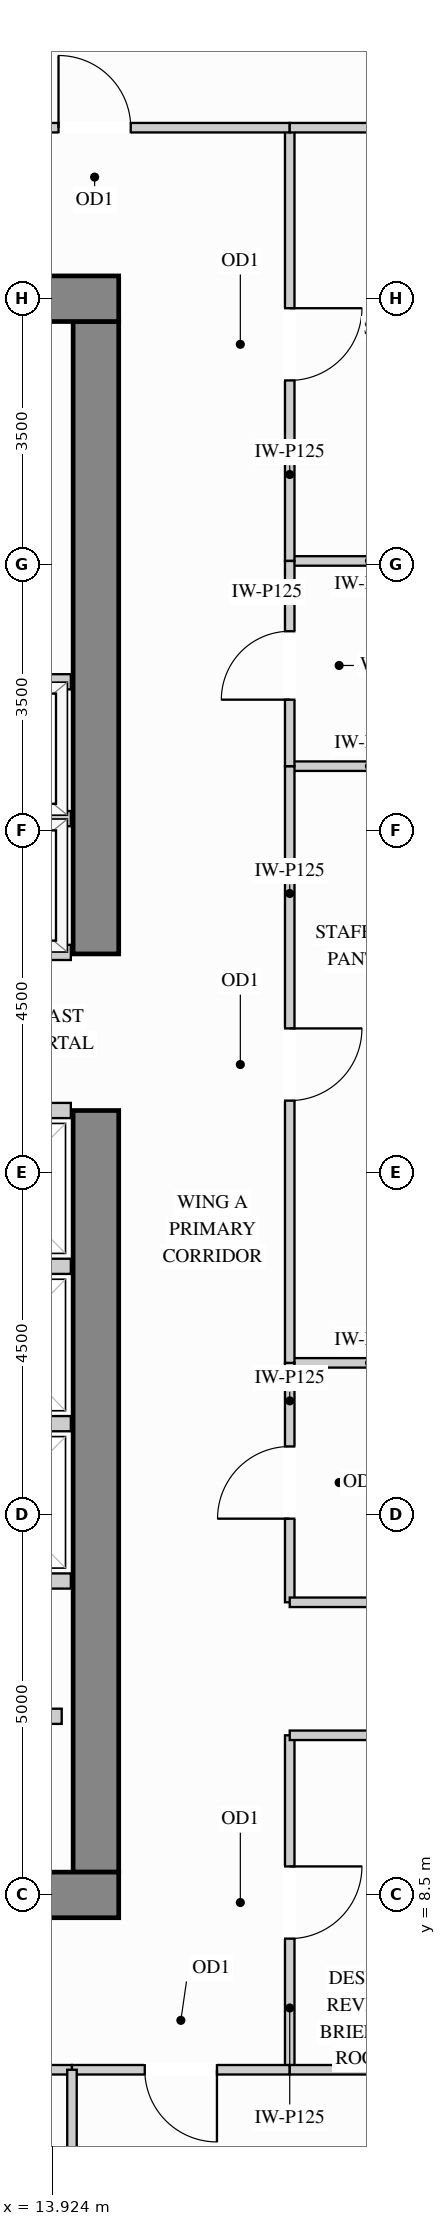
"""IFC4 building model, lengths in metres.
Left out: names, types, materials, properties, quantities, classifications, styles, units other than length and angle.
Written with IfcOpenShell. Run it as: python <this file> out.ifc"""

import sys

from ifc_helpers import new_model, si_unit, direction, frame, frame_2d, origin, place, context, subcontext, project, spatial, rectangle, extrude, source, transform, mapped, element, fill, save


model = new_model("IFC4")
c1 = context("Model", 3, precision=1e-05, world=origin(), true_north=direction((0.0, 1.0)))
c2 = subcontext(c1, "Body", "Model", "MODEL_VIEW")
j1 = project(units=[si_unit("LENGTHUNIT", "METRE"), si_unit("PLANEANGLEUNIT", "RADIAN")], contexts=[c1])
p1 = place(None, origin())
s1 = spatial("IfcSite", under=j1, at=p1, CompositionType="ELEMENT")
p2 = place(p1, origin())
s2 = spatial("IfcBuilding", under=s1, at=p2, CompositionType="ELEMENT")
p3 = place(p2, frame((0.0, 0.0, 200.7)))
s3 = spatial("IfcBuildingStorey", under=s2, at=p3, CompositionType="ELEMENT", Elevation=200.7)
m1 = source(origin(), c2, "Body", "SweptSolid", [
    extrude(rectangle(XDim=10.02, YDim=0.6, at=frame_2d((5.01, 0.0))), origin(), (0.0, 0.0, 1.0), 3.4),
])
p4 = place(p3, frame((14.5, 8.8, 0.0), z_axis=(0.0, 0.0, 1.0), x_axis=(0.0, 1.0, 0.0)))
e1 = element("IfcWall", 1, at=p4, inside=s3, PredefinedType="SHEAR", context=c2, shape_type="MappedRepresentation", body=[
    mapped(m1, transform((0.0, 0.0, 0.0), x_axis=(1.0, 0.0, 0.0), y_axis=(0.0, 1.0, 0.0), z_axis=(0.0, 0.0, 1.0))),
])
m2 = source(origin(), c2, "Body", "SweptSolid", [
    extrude(rectangle(XDim=8.32, YDim=0.6, at=frame_2d((4.16, 0.0))), origin(), (0.0, 0.0, 1.0), 3.4),
])
p5 = place(p3, frame((14.5, 20.88, 0.0), z_axis=(0.0, 0.0, 1.0), x_axis=(0.0, 1.0, 0.0)))
e2 = element("IfcWall", 2, at=p5, inside=s3, PredefinedType="SHEAR", context=c2, shape_type="MappedRepresentation", body=[
    mapped(m2, transform((0.0, 0.0, 0.0), x_axis=(1.0, 0.0, 0.0), y_axis=(0.0, 1.0, 0.0), z_axis=(0.0, 0.0, 1.0))),
])
m3 = source(origin(), c2, "Body", "SweptSolid", [
    extrude(rectangle(XDim=10.6, YDim=0.6, at=frame_2d((5.3, 0.0))), origin(), (0.0, 0.0, 1.0), 3.4),
])
for number, where, z_axis, x_axis in (
    (3, (4.2, 29.5, 0.0), (0.0, 0.0, 1.0), (1.0, 0.0, 0.0)),
    (4, (4.2, 8.5, 0.0), (0.0, 0.0, 1.0), (1.0, 0.0, 0.0)),
):
    element("IfcWall", number, at=place(p3, frame(where, z_axis=z_axis, x_axis=x_axis)), inside=s3, PredefinedType="SHEAR", context=c2, shape_type="MappedRepresentation", body=[
        mapped(m3, transform((0.0, 0.0, 0.0), x_axis=(1.0, 0.0, 0.0), y_axis=(0.0, 1.0, 0.0), z_axis=(0.0, 0.0, 1.0))),
    ])
m4 = source(origin(), c2, "Body", "SweptSolid", [
    extrude(rectangle(XDim=2.1, YDim=0.125, at=frame_2d((1.05, 0.0))), origin(), (0.0, 0.0, 1.0), 3.385),
])
p6 = place(p3, frame((17.05, 15.5, 0.0), z_axis=(0.0, 0.0, 1.0), x_axis=(1.0, 0.0, 0.0)))
e5 = element("IfcWall", 5, at=p6, inside=s3, PredefinedType="PARTITIONING", context=c2, shape_type="MappedRepresentation", body=[
    mapped(m4, transform((0.0, 0.0, 0.0), x_axis=(1.0, 0.0, 0.0), y_axis=(0.0, 1.0, 0.0), z_axis=(0.0, 0.0, 1.0))),
])
m5 = source(origin(), c2, "Body", "SweptSolid", [
    extrude(rectangle(XDim=2.098, YDim=0.125, at=frame_2d((1.049, 0.0))), origin(), (0.0, 0.0, 1.0), 3.385),
])
for number, where, z_axis, x_axis in (
    (6, (17.05, 23.35, 0.0), (0.0, 0.0, 1.0), (1.0, 0.0, 0.0)),
    (7, (17.05, 26.05, 0.0), (0.0, 0.0, 1.0), (1.0, 0.0, 0.0)),
):
    element("IfcWall", number, at=place(p3, frame(where, z_axis=z_axis, x_axis=x_axis)), inside=s3, PredefinedType="PARTITIONING", context=c2, shape_type="MappedRepresentation", body=[
        mapped(m5, transform((0.0, 0.0, 0.0), x_axis=(1.0, 0.0, 0.0), y_axis=(0.0, 1.0, 0.0), z_axis=(0.0, 0.0, 1.0))),
    ])
p7 = place(p3, frame((17.05, 12.35, 0.0), z_axis=(0.0, 0.0, 1.0), x_axis=(0.0, 1.0, 0.0)))
e8 = element("IfcWall", 8, at=p7, inside=s3, PredefinedType="PARTITIONING", context=c2, shape_type="SweptSolid", body=[
    extrude(rectangle(XDim=3.15, YDim=0.125, at=frame_2d((1.575, 0.0))), origin(), (0.0, 0.0, 1.0), 3.385),
])
p8 = place(p7, frame((1.1, 0.0, 0.0)))
e9 = element("IfcOpeningElement", 9, at=p8, cuts=e8, PredefinedType="OPENING", context=c2, shape_type="SweptSolid", body=[
    extrude(rectangle(XDim=0.95, YDim=2.15, at=frame_2d((0.475, 1.075))), frame((0.0, 0.073, 0.0), z_axis=(0.0, -1.0, 0.0), x_axis=(1.0, 0.0, 0.0)), (0.0, 0.0, 1.0), 0.145),
])
p9 = place(p3, frame((17.05, 15.5, 0.0), z_axis=(0.0, 0.0, 1.0), x_axis=(0.0, 1.0, 0.0)))
e10 = element("IfcWall", 10, at=p9, inside=s3, PredefinedType="PARTITIONING", context=c2, shape_type="SweptSolid", body=[
    extrude(rectangle(XDim=7.85, YDim=0.125, at=frame_2d((3.925, 0.0))), origin(), (0.0, 0.0, 1.0), 3.385),
])
p10 = place(p9, frame((3.45, 0.0, 0.0)))
e11 = element("IfcOpeningElement", 11, at=p10, cuts=e10, PredefinedType="OPENING", context=c2, shape_type="SweptSolid", body=[
    extrude(rectangle(XDim=0.95, YDim=2.15, at=frame_2d((0.475, 1.075))), frame((0.0, 0.073, 0.0), z_axis=(0.0, -1.0, 0.0), x_axis=(1.0, 0.0, 0.0)), (0.0, 0.0, 1.0), 0.145),
])
p11 = place(p3, frame((17.05, 26.05, 0.0), z_axis=(0.0, 0.0, 1.0), x_axis=(0.0, 1.0, 0.0)))
e12 = element("IfcWall", 12, at=p11, inside=s3, PredefinedType="PARTITIONING", context=c2, shape_type="SweptSolid", body=[
    extrude(rectangle(XDim=5.7, YDim=0.125, at=frame_2d((2.85, 0.0))), origin(), (0.0, 0.0, 1.0), 3.385),
])
p12 = place(p11, frame((2.375, 0.0, 0.0)))
e13 = element("IfcOpeningElement", 13, at=p12, cuts=e12, PredefinedType="OPENING", context=c2, shape_type="SweptSolid", body=[
    extrude(rectangle(XDim=0.95, YDim=2.15, at=frame_2d((0.475, 1.075))), frame((0.0, 0.073, 0.0), z_axis=(0.0, -1.0, 0.0), x_axis=(1.0, 0.0, 0.0)), (0.0, 0.0, 1.0), 0.145),
])
p13 = place(p3, frame((17.05, 6.2, 0.0), z_axis=(0.0, 0.0, 1.0), x_axis=(0.0, 1.0, 0.0)))
e14 = element("IfcWall", 14, at=p13, inside=s3, PredefinedType="PARTITIONING", context=c2, shape_type="SweptSolid", body=[
    extrude(rectangle(XDim=4.4, YDim=0.125, at=frame_2d((2.2, 0.0))), origin(), (0.0, 0.0, 1.0), 3.385),
])
p14 = place(p13, frame((1.725, 0.0, 0.0)))
e15 = element("IfcOpeningElement", 15, at=p14, cuts=e14, PredefinedType="OPENING", context=c2, shape_type="SweptSolid", body=[
    extrude(rectangle(XDim=0.95, YDim=2.15, at=frame_2d((0.475, 1.075))), frame((0.0, 0.073, 0.0), z_axis=(0.0, -1.0, 0.0), x_axis=(1.0, 0.0, 0.0)), (0.0, 0.0, 1.0), 0.145),
])
p15 = place(p3, frame((17.05, 23.35, 0.0), z_axis=(0.0, 0.0, 1.0), x_axis=(0.0, 1.0, 0.0)))
e16 = element("IfcWall", 16, at=p15, inside=s3, PredefinedType="PARTITIONING", context=c2, shape_type="SweptSolid", body=[
    extrude(rectangle(XDim=2.7, YDim=0.125, at=frame_2d((1.35, 0.0))), origin(), (0.0, 0.0, 1.0), 3.385),
])
p16 = place(p15, frame((0.875, 0.0, 0.0)))
e17 = element("IfcOpeningElement", 17, at=p16, cuts=e16, PredefinedType="OPENING", context=c2, shape_type="SweptSolid", body=[
    extrude(rectangle(XDim=0.9, YDim=2.15, at=frame_2d((0.45, 1.075))), frame((0.0, 0.073, 0.0), z_axis=(0.0, -1.0, 0.0), x_axis=(1.0, 0.0, 0.0)), (0.0, 0.0, 1.0), 0.145),
])
p17 = place(p3, frame((11.916, 31.75, 0.0), z_axis=(0.0, 0.0, 1.0), x_axis=(1.0, 0.0, 0.0)))
e18 = element("IfcWall", 18, at=p17, inside=s3, PredefinedType="PARTITIONING", context=c2, shape_type="SweptSolid", body=[
    extrude(rectangle(XDim=5.134, YDim=0.125, at=frame_2d((2.567, 0.0))), origin(), (0.0, 0.0, 1.0), 2.848),
])
p18 = place(p17, frame((2.092, 0.0, 0.0)))
e19 = element("IfcOpeningElement", 19, at=p18, cuts=e18, PredefinedType="OPENING", context=c2, shape_type="SweptSolid", body=[
    extrude(rectangle(XDim=0.95, YDim=2.15, at=frame_2d((0.475, 1.075))), frame((0.0, 0.073, 0.0), z_axis=(0.0, -1.0, 0.0), x_axis=(1.0, 0.0, 0.0)), (0.0, 0.0, 1.0), 0.145),
])
m6 = source(origin(), c2, "Body", "SweptSolid", [
    extrude(rectangle(XDim=2.098, YDim=0.125, at=frame_2d((1.049, 0.0))), origin(), (0.0, 0.0, 1.0), 2.848),
])
p19 = place(p3, frame((17.05, 31.75, 0.0), z_axis=(0.0, 0.0, 1.0), x_axis=(1.0, 0.0, 0.0)))
e20 = element("IfcWall", 20, at=p19, inside=s3, PredefinedType="PARTITIONING", context=c2, shape_type="MappedRepresentation", body=[
    mapped(m6, transform((0.0, 0.0, 0.0), x_axis=(1.0, 0.0, 0.0), y_axis=(0.0, 1.0, 0.0), z_axis=(0.0, 0.0, 1.0))),
])
m7 = source(origin(), c2, "Body", "SweptSolid", [
    extrude(rectangle(XDim=2.45, YDim=0.125, at=frame_2d((1.225, 0.0))), origin(), (0.0, 0.0, 1.0), 3.385),
])
for number, where, z_axis, x_axis in (
    (21, (17.05, 12.35, 0.0), (0.0, 0.0, 1.0), (1.0, 0.0, 0.0)),
    (22, (17.05, 10.6, 0.0), (0.0, 0.0, 1.0), (1.0, 0.0, 0.0)),
):
    element("IfcWall", number, at=place(p3, frame(where, z_axis=z_axis, x_axis=x_axis)), inside=s3, PredefinedType="PARTITIONING", context=c2, shape_type="MappedRepresentation", body=[
        mapped(m7, transform((0.0, 0.0, 0.0), x_axis=(1.0, 0.0, 0.0), y_axis=(0.0, 1.0, 0.0), z_axis=(0.0, 0.0, 1.0))),
    ])
p20 = place(p3, frame((10.544, 6.2, 0.0), z_axis=(0.0, 0.0, 1.0), x_axis=(1.0, 0.0, 0.0)))
e23 = element("IfcWall", 23, at=p20, inside=s3, PredefinedType="PARTITIONING", context=c2, shape_type="SweptSolid", body=[
    extrude(rectangle(XDim=3.641, YDim=0.125, at=frame_2d((1.821, 0.0))), origin(), (0.0, 0.0, 1.0), 2.848),
])
p21 = place(p20, frame((1.345, 0.0, 0.0)))
e24 = element("IfcOpeningElement", 24, at=p21, cuts=e23, PredefinedType="OPENING", context=c2, shape_type="SweptSolid", body=[
    extrude(rectangle(XDim=0.95, YDim=2.15, at=frame_2d((0.475, 1.075))), frame((0.0, 0.073, 0.0), z_axis=(0.0, -1.0, 0.0), x_axis=(1.0, 0.0, 0.0)), (0.0, 0.0, 1.0), 0.145),
])
p22 = place(p3, frame((14.185, 6.2, 0.0), z_axis=(0.0, 0.0, 1.0), x_axis=(1.0, 0.0, 0.0)))
e25 = element("IfcWall", 25, at=p22, inside=s3, PredefinedType="PARTITIONING", context=c2, shape_type="SweptSolid", body=[
    extrude(rectangle(XDim=2.865, YDim=0.125, at=frame_2d((1.433, 0.0))), origin(), (0.0, 0.0, 1.0), 2.848),
])
p23 = place(p22, frame((0.958, 0.0, 0.0)))
e26 = element("IfcOpeningElement", 26, at=p23, cuts=e25, PredefinedType="OPENING", context=c2, shape_type="SweptSolid", body=[
    extrude(rectangle(XDim=0.95, YDim=2.15, at=frame_2d((0.475, 1.075))), frame((0.0, 0.073, 0.0), z_axis=(0.0, -1.0, 0.0), x_axis=(1.0, 0.0, 0.0)), (0.0, 0.0, 1.0), 0.145),
])
p24 = place(p3, frame((17.05, 6.2, 0.0), z_axis=(0.0, 0.0, 1.0), x_axis=(1.0, 0.0, 0.0)))
e27 = element("IfcWall", 27, at=p24, inside=s3, PredefinedType="PARTITIONING", context=c2, shape_type="MappedRepresentation", body=[
    mapped(m6, transform((0.0, 0.0, 0.0), x_axis=(1.0, 0.0, 0.0), y_axis=(0.0, 1.0, 0.0), z_axis=(0.0, 0.0, 1.0))),
])
m8 = source(origin(), c2, "Body", "SweptSolid", [
    extrude(rectangle(XDim=5.08, YDim=0.125, at=frame_2d((2.54, 0.0))), origin(), (0.0, 0.0, 1.0), 3.385),
])
p25 = place(p3, frame((14.185, 1.12, 0.0), z_axis=(0.0, 0.0, 1.0), x_axis=(0.0, 1.0, 0.0)))
e28 = element("IfcWall", 28, at=p25, inside=s3, PredefinedType="PARTITIONING", context=c2, shape_type="MappedRepresentation", body=[
    mapped(m8, transform((0.0, 0.0, 0.0), x_axis=(1.0, 0.0, 0.0), y_axis=(0.0, 1.0, 0.0), z_axis=(0.0, 0.0, 1.0))),
])
m9 = source(origin(), c2, "Body", "SweptSolid", [
    extrude(rectangle(XDim=1.63, YDim=0.2, at=frame_2d((0.815, 0.0))), origin(), (0.0, 0.0, 1.0), 3.385),
])
p26 = place(p3, frame((12.42, 10.85, 0.0), z_axis=(0.0, 0.0, 1.0), x_axis=(1.0, 0.0, 0.0)))
e29 = element("IfcWall", 29, at=p26, inside=s3, PredefinedType="PARTITIONING", context=c2, shape_type="MappedRepresentation", body=[
    mapped(m9, transform((0.0, 0.0, 0.0), x_axis=(1.0, 0.0, 0.0), y_axis=(0.0, 1.0, 0.0), z_axis=(0.0, 0.0, 1.0))),
])
m10 = source(origin(), c2, "Body", "SweptSolid", [
    extrude(rectangle(XDim=2.34, YDim=0.2, at=frame_2d((1.17, 0.0))), origin(), (0.0, 0.0, 1.0), 3.385),
])
for number, where, z_axis, x_axis in (
    (30, (11.83, 22.66, 0.0), (0.0, 0.0, 1.0), (1.0, 0.0, 0.0)),
    (31, (11.83, 20.9, 0.0), (0.0, 0.0, 1.0), (1.0, 0.0, 0.0)),
    (32, (11.83, 24.46, 0.0), (0.0, 0.0, 1.0), (1.0, 0.0, 0.0)),
):
    element("IfcWall", number, at=place(p3, frame(where, z_axis=z_axis, x_axis=x_axis)), inside=s3, PredefinedType="PARTITIONING", context=c2, shape_type="MappedRepresentation", body=[
        mapped(m10, transform((0.0, 0.0, 0.0), x_axis=(1.0, 0.0, 0.0), y_axis=(0.0, 1.0, 0.0), z_axis=(0.0, 0.0, 1.0))),
    ])
m11 = source(origin(), c2, "Body", "SweptSolid", [
    extrude(rectangle(XDim=1.94, YDim=0.2, at=frame_2d((0.97, 0.0))), origin(), (0.0, 0.0, 1.0), 3.385),
])
for number, where, z_axis, x_axis in (
    (33, (12.23, 14.7, 0.0), (0.0, 0.0, 1.0), (1.0, 0.0, 0.0)),
    (34, (12.23, 12.63, 0.0), (0.0, 0.0, 1.0), (1.0, 0.0, 0.0)),
    (35, (12.23, 16.77, 0.0), (0.0, 0.0, 1.0), (1.0, 0.0, 0.0)),
    (36, (12.23, 18.82, 0.0), (0.0, 0.0, 1.0), (1.0, 0.0, 0.0)),
):
    element("IfcWall", number, at=place(p3, frame(where, z_axis=z_axis, x_axis=x_axis)), inside=s3, PredefinedType="PARTITIONING", context=c2, shape_type="MappedRepresentation", body=[
        mapped(m11, transform((0.0, 0.0, 0.0), x_axis=(1.0, 0.0, 0.0), y_axis=(0.0, 1.0, 0.0), z_axis=(0.0, 0.0, 1.0))),
    ])
m12 = source(origin(), c2, "Body", "SweptSolid", [
    extrude(rectangle(XDim=0.95, YDim=2.15, at=frame_2d((0.475, 1.075))), frame((0.0, 0.025, 0.0), z_axis=(0.0, -1.0, 0.0), x_axis=(1.0, 0.0, 0.0)), (0.0, 0.0, 1.0), 0.05),
])
p27 = place(p14, origin())
e37 = element("IfcDoor", 37, at=p27, inside=s3, OperationType="SINGLE_SWING_RIGHT", PredefinedType="DOOR", context=c2, shape_type="MappedRepresentation", body=[
    mapped(m12, transform((0.0, 0.0, 0.0), x_axis=(1.0, 0.0, 0.0), y_axis=(0.0, 1.0, 0.0), z_axis=(0.0, 0.0, 1.0))),
])
fill(e15, e37)
p28 = place(p8, origin())
e38 = element("IfcDoor", 38, at=p28, inside=s3, OperationType="SINGLE_SWING_LEFT", PredefinedType="DOOR", context=c2, shape_type="MappedRepresentation", body=[
    mapped(m12, transform((0.0, 0.0, 0.0), x_axis=(1.0, 0.0, 0.0), y_axis=(0.0, 1.0, 0.0), z_axis=(0.0, 0.0, 1.0))),
])
fill(e9, e38)
p29 = place(p10, origin())
e39 = element("IfcDoor", 39, at=p29, inside=s3, OperationType="SINGLE_SWING_RIGHT", PredefinedType="DOOR", context=c2, shape_type="MappedRepresentation", body=[
    mapped(m12, transform((0.0, 0.0, 0.0), x_axis=(1.0, 0.0, 0.0), y_axis=(0.0, 1.0, 0.0), z_axis=(0.0, 0.0, 1.0))),
])
fill(e11, e39)
p30 = place(p12, origin())
e40 = element("IfcDoor", 40, at=p30, inside=s3, OperationType="SINGLE_SWING_RIGHT", PredefinedType="DOOR", context=c2, shape_type="MappedRepresentation", body=[
    mapped(m12, transform((0.0, 0.0, 0.0), x_axis=(1.0, 0.0, 0.0), y_axis=(0.0, 1.0, 0.0), z_axis=(0.0, 0.0, 1.0))),
])
fill(e13, e40)
p31 = place(p18, origin())
e41 = element("IfcDoor", 41, at=p31, inside=s3, OperationType="SINGLE_SWING_LEFT", PredefinedType="DOOR", context=c2, shape_type="MappedRepresentation", body=[
    mapped(m12, transform((0.0, 0.0, 0.0), x_axis=(1.0, 0.0, 0.0), y_axis=(0.0, 1.0, 0.0), z_axis=(0.0, 0.0, 1.0))),
])
fill(e19, e41)
p32 = place(p23, origin())
e42 = element("IfcDoor", 42, at=p32, inside=s3, OperationType="SINGLE_SWING_RIGHT", PredefinedType="DOOR", context=c2, shape_type="MappedRepresentation", body=[
    mapped(m12, transform((0.0, 0.0, 0.0), x_axis=(1.0, 0.0, 0.0), y_axis=(0.0, 1.0, 0.0), z_axis=(0.0, 0.0, 1.0))),
])
fill(e26, e42)
m13 = source(origin(), c2, "Body", "SweptSolid", [
    extrude(rectangle(XDim=0.9, YDim=2.15, at=frame_2d((0.45, 1.075))), frame((0.0, 0.025, 0.0), z_axis=(0.0, -1.0, 0.0), x_axis=(1.0, 0.0, 0.0)), (0.0, 0.0, 1.0), 0.05),
])
p33 = place(p16, origin())
e43 = element("IfcDoor", 43, at=p33, inside=s3, OperationType="SINGLE_SWING_LEFT", PredefinedType="DOOR", context=c2, shape_type="MappedRepresentation", body=[
    mapped(m13, transform((0.0, 0.0, 0.0), x_axis=(1.0, 0.0, 0.0), y_axis=(0.0, 1.0, 0.0), z_axis=(0.0, 0.0, 1.0))),
])
fill(e17, e43)
save(model, sys.argv[1])
